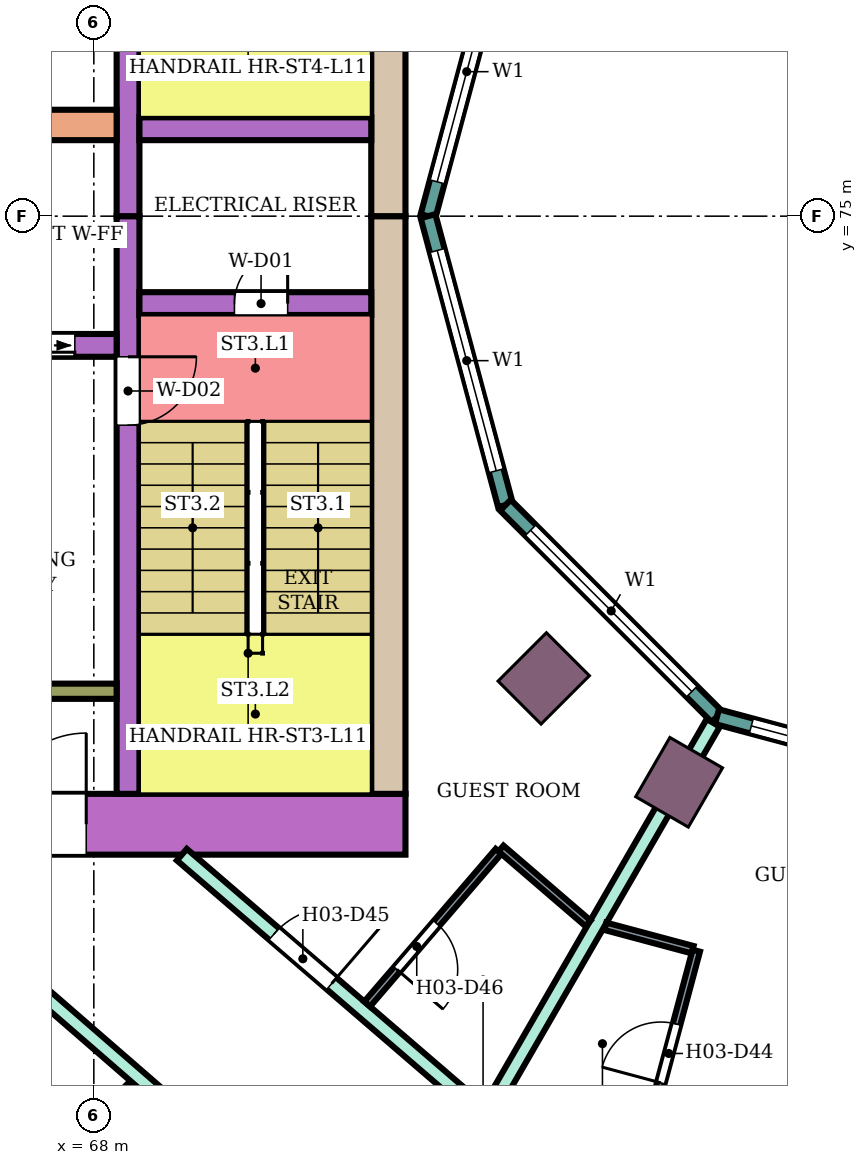
"""IFC4 building model, lengths in metres.
Left out: names, types, materials, properties, quantities, classifications, styles, units other than length and angle.
Written with IfcOpenShell. Run it as: python <this file> out.ifc"""

import sys

from ifc_helpers import new_model, si_unit, direction, frame, frame_2d, origin, origin_2d, place, context, subcontext, project, spatial, rectangle, extrude, element, fill, save


model = new_model("IFC4")
c1 = context("Model", 3, precision=1e-05, world=origin(), true_north=direction((0.0, 1.0)))
c2 = subcontext(c1, "Body", "Model", "MODEL_VIEW")
j1 = project(units=[si_unit("LENGTHUNIT", "METRE"), si_unit("PLANEANGLEUNIT", "RADIAN")], contexts=[c1])
p1 = place(None, origin())
s1 = spatial("IfcSite", under=j1, at=p1, CompositionType="ELEMENT")
p2 = place(p1, origin())
s2 = spatial("IfcBuilding", under=s1, at=p2, CompositionType="ELEMENT")
p3 = place(p2, frame((0.0, 0.0, 51.6)))
s3 = spatial("IfcBuildingStorey", under=s2, at=p3, CompositionType="ELEMENT", Elevation=51.6)
for number, where, z_axis, x_axis in (
    (1, (73.919, 68.919, 0.0), (0.0, 0.0, 1.0), (-0.707, -0.707, 0.0)),
    (2, (75.7, 67.552, 0.0), (0.0, 0.0, 1.0), (-0.5, -0.866, 0.0)),
):
    element("IfcColumn", number, at=place(p3, frame(where, z_axis=z_axis, x_axis=x_axis)), inside=s3, PredefinedType="COLUMN", context=c2, shape_type="SweptSolid", body=[
        extrude(rectangle(XDim=0.9, YDim=0.8, at=origin_2d()), origin(), (0.0, 0.0, 1.0), 3.8),
    ])
p4 = place(p3, frame((72.1, 67.0, 0.0), z_axis=(0.0, 0.0, 1.0), x_axis=(-1.0, 0.0, 0.0)))
e3 = element("IfcWall", 3, at=p4, inside=s3, PredefinedType="SHEAR", context=c2, shape_type="SweptSolid", body=[
    extrude(rectangle(XDim=14.7, YDim=0.8, at=frame_2d((7.35, 0.0))), origin(), (0.0, 0.0, 1.0), 3.48),
])
p5 = place(p4, frame((4.2, 0.0, 0.0)))
e4 = element("IfcOpeningElement", 4, at=p5, cuts=e3, PredefinedType="OPENING", context=c2, shape_type="SweptSolid", body=[
    extrude(rectangle(XDim=2.4, YDim=2.4, at=frame_2d((1.2, 1.2))), frame((0.0, 0.41, 0.0), z_axis=(0.0, -1.0, 0.0), x_axis=(1.0, 0.0, 0.0)), (0.0, 0.0, 1.0), 0.82),
])
for number, where, z_axis, x_axis in (
    (5, (71.875, 75.0, 0.0), (0.0, 0.0, 1.0), (0.0, -1.0, 0.0)),
    (6, (71.875, 82.6, 0.0), (0.0, 0.0, 1.0), (0.0, -1.0, 0.0)),
):
    element("IfcWall", number, at=place(p3, frame(where, z_axis=z_axis, x_axis=x_axis)), inside=s3, PredefinedType="SHEAR", context=c2, shape_type="SweptSolid", body=[
        extrude(rectangle(XDim=7.6, YDim=0.45, at=frame_2d((3.8, 0.0))), origin(), (0.0, 0.0, 1.0), 3.48),
    ])
p6 = place(p3, frame((68.45, 75.0, 0.0), z_axis=(0.0, 0.0, 1.0), x_axis=(0.0, -1.0, 0.0)))
e7 = element("IfcWall", 7, at=p6, inside=s3, PredefinedType="SHEAR", context=c2, shape_type="SweptSolid", body=[
    extrude(rectangle(XDim=7.6, YDim=0.3, at=frame_2d((3.8, 0.0))), origin(), (0.0, 0.0, 1.0), 3.48),
])
p7 = place(p6, frame((1.85, 0.0, 0.0)))
e8 = element("IfcOpeningElement", 8, at=p7, cuts=e7, PredefinedType="OPENING", context=c2, shape_type="SweptSolid", body=[
    extrude(rectangle(XDim=0.9, YDim=2.1, at=frame_2d((0.45, 1.05))), frame((0.0, 0.16, 0.0), z_axis=(0.0, -1.0, 0.0), x_axis=(1.0, 0.0, 0.0)), (0.0, 0.0, 1.0), 0.32),
])
p8 = place(p3, frame((68.45, 82.6, 0.0), z_axis=(0.0, 0.0, 1.0), x_axis=(0.0, -1.0, 0.0)))
e9 = element("IfcWall", 9, at=p8, inside=s3, PredefinedType="SHEAR", context=c2, shape_type="SweptSolid", body=[
    extrude(rectangle(XDim=7.6, YDim=0.3, at=frame_2d((3.8, 0.0))), origin(), (0.0, 0.0, 1.0), 3.48),
])
p9 = place(p8, frame((0.25, 0.0, 0.0)))
e10 = element("IfcOpeningElement", 10, at=p9, cuts=e9, PredefinedType="OPENING", context=c2, shape_type="SweptSolid", body=[
    extrude(rectangle(XDim=0.9, YDim=2.1, at=frame_2d((0.45, 1.05))), frame((0.0, 0.16, 0.0), z_axis=(0.0, -1.0, 0.0), x_axis=(1.0, 0.0, 0.0)), (0.0, 0.0, 1.0), 0.32),
])
p10 = place(p3, frame((71.65, 73.85, 0.0), z_axis=(0.0, 0.0, 1.0), x_axis=(-1.0, 0.0, 0.0)))
e11 = element("IfcWall", 11, at=p10, inside=s3, PredefinedType="SHEAR", context=c2, shape_type="SweptSolid", body=[
    extrude(rectangle(XDim=3.05, YDim=0.3, at=frame_2d((1.525, 0.0))), origin(), (0.0, 0.0, 1.0), 3.48),
])
p11 = place(p10, frame((1.1, 0.0, 0.0)))
e12 = element("IfcOpeningElement", 12, at=p11, cuts=e11, PredefinedType="OPENING", context=c2, shape_type="SweptSolid", body=[
    extrude(rectangle(XDim=0.7, YDim=2.0, at=frame_2d((0.35, 1.0))), frame((0.0, 0.16, 0.0), z_axis=(0.0, -1.0, 0.0), x_axis=(1.0, 0.0, 0.0)), (0.0, 0.0, 1.0), 0.32),
])
p12 = place(p3, frame((71.65, 76.15, 0.0), z_axis=(0.0, 0.0, 1.0), x_axis=(-1.0, 0.0, 0.0)))
e13 = element("IfcWall", 13, at=p12, inside=s3, PredefinedType="SHEAR", context=c2, shape_type="SweptSolid", body=[
    extrude(rectangle(XDim=3.05, YDim=0.3, at=frame_2d((1.525, 0.0))), origin(), (0.0, 0.0, 1.0), 3.48),
])
p13 = place(p3, frame((68.3, 73.3, 0.0), z_axis=(0.0, 0.0, 1.0), x_axis=(-1.0, 0.0, 0.0)))
e14 = element("IfcWall", 14, at=p13, inside=s3, PredefinedType="SHEAR", context=c2, shape_type="SweptSolid", body=[
    extrude(rectangle(XDim=10.9, YDim=0.3, at=frame_2d((5.45, 0.0))), origin(), (0.0, 0.0, 1.0), 3.48),
])
p14 = place(p13, frame((0.55, 0.0, 0.0)))
e15 = element("IfcOpeningElement", 15, at=p14, cuts=e14, PredefinedType="OPENING", context=c2, shape_type="SweptSolid", body=[
    extrude(rectangle(XDim=1.1, YDim=2.1, at=frame_2d((0.55, 1.05))), frame((0.0, 0.16, 0.0), z_axis=(0.0, -1.0, 0.0), x_axis=(1.0, 0.0, 0.0)), (0.0, 0.0, 1.0), 0.32),
])
p15 = place(p13, frame((8.1, 0.0, 0.0)))
e16 = element("IfcOpeningElement", 16, at=p15, cuts=e14, PredefinedType="OPENING", context=c2, shape_type="SweptSolid", body=[
    extrude(rectangle(XDim=1.0, YDim=2.1, at=frame_2d((0.5, 1.05))), frame((0.0, 0.16, 0.0), z_axis=(0.0, -1.0, 0.0), x_axis=(1.0, 0.0, 0.0)), (0.0, 0.0, 1.0), 0.32),
])
p16 = place(p3, frame((68.3, 76.2, 0.0), z_axis=(0.0, 0.0, 1.0), x_axis=(-1.0, 0.0, 0.0)))
e17 = element("IfcWall", 17, at=p16, inside=s3, PredefinedType="SHEAR", context=c2, shape_type="SweptSolid", body=[
    extrude(rectangle(XDim=10.9, YDim=0.4, at=frame_2d((5.45, 0.0))), origin(), (0.0, 0.0, 1.0), 3.48),
])
p17 = place(p3, frame((68.3, 68.75, 0.0), z_axis=(0.0, 0.0, 1.0), x_axis=(-1.0, 0.0, 0.0)))
e18 = element("IfcWall", 18, at=p17, inside=s3, PredefinedType="SHEAR", context=c2, shape_type="SweptSolid", body=[
    extrude(rectangle(XDim=4.65, YDim=0.2, at=frame_2d((2.325, 0.0))), origin(), (0.0, 0.0, 1.0), 3.48),
])
p18 = place(p3, frame((73.415, 78.802, 0.0), z_axis=(0.0, 0.0, 1.0), x_axis=(-0.258789828301, -0.965933654434, 0.0)))
e19 = element("IfcWall", 19, at=p18, inside=s3, PredefinedType="NOTDEFINED", context=c2, shape_type="SweptSolid", body=[
    extrude(rectangle(XDim=3.936, YDim=0.2, at=frame_2d((1.968, 0.0))), origin(), (0.0, 0.0, 1.0), 3.8),
])
p19 = place(p18, frame((0.468, 0.0, 0.9)))
e20 = element("IfcOpeningElement", 20, at=p19, cuts=e19, PredefinedType="OPENING", context=c2, shape_type="SweptSolid", body=[
    extrude(rectangle(XDim=3.0, YDim=2.3, at=frame_2d((1.5, 1.15))), frame((0.0, 0.11, 0.0), z_axis=(0.0, -1.0, 0.0), x_axis=(1.0, 0.0, 0.0)), (0.0, 0.0, 1.0), 0.22),
])
p20 = place(p3, frame((72.396, 75.0, 0.0), z_axis=(0.0, 0.0, 1.0), x_axis=(0.258789828301, -0.965933654434, 0.0)))
e21 = element("IfcWall", 21, at=p20, inside=s3, PredefinedType="NOTDEFINED", context=c2, shape_type="SweptSolid", body=[
    extrude(rectangle(XDim=3.936, YDim=0.2, at=frame_2d((1.968, 0.0))), origin(), (0.0, 0.0, 1.0), 3.8),
])
p21 = place(p20, frame((0.468, 0.0, 0.9)))
e22 = element("IfcOpeningElement", 22, at=p21, cuts=e21, PredefinedType="OPENING", context=c2, shape_type="SweptSolid", body=[
    extrude(rectangle(XDim=3.0, YDim=2.3, at=frame_2d((1.5, 1.15))), frame((0.0, 0.11, 0.0), z_axis=(0.0, -1.0, 0.0), x_axis=(1.0, 0.0, 0.0)), (0.0, 0.0, 1.0), 0.22),
])
p22 = place(p3, frame((73.415, 71.198, 0.0), z_axis=(0.0, 0.0, 1.0), x_axis=(0.707106781187, -0.707106781187, 0.0)))
e23 = element("IfcWall", 23, at=p22, inside=s3, PredefinedType="NOTDEFINED", context=c2, shape_type="SweptSolid", body=[
    extrude(rectangle(XDim=3.936, YDim=0.2, at=frame_2d((1.968, 0.0))), origin(), (0.0, 0.0, 1.0), 3.8),
])
p23 = place(p22, frame((0.468, 0.0, 0.9)))
e24 = element("IfcOpeningElement", 24, at=p23, cuts=e23, PredefinedType="OPENING", context=c2, shape_type="SweptSolid", body=[
    extrude(rectangle(XDim=3.0, YDim=2.3, at=frame_2d((1.5, 1.15))), frame((0.0, 0.11, 0.0), z_axis=(0.0, -1.0, 0.0), x_axis=(1.0, 0.0, 0.0)), (0.0, 0.0, 1.0), 0.22),
])
p24 = place(p3, frame((76.198, 68.415, 0.0), z_axis=(0.0, 0.0, 1.0), x_axis=(0.965933654434, -0.258789828301, 0.0)))
e25 = element("IfcWall", 25, at=p24, inside=s3, PredefinedType="NOTDEFINED", context=c2, shape_type="SweptSolid", body=[
    extrude(rectangle(XDim=3.936, YDim=0.2, at=frame_2d((1.968, 0.0))), origin(), (0.0, 0.0, 1.0), 3.8),
])
p25 = place(p24, frame((0.468, 0.0, 0.9)))
e26 = element("IfcOpeningElement", 26, at=p25, cuts=e25, PredefinedType="OPENING", context=c2, shape_type="SweptSolid", body=[
    extrude(rectangle(XDim=3.0, YDim=2.3, at=frame_2d((1.5, 1.15))), frame((0.0, 0.11, 0.0), z_axis=(0.0, -1.0, 0.0), x_axis=(1.0, 0.0, 0.0)), (0.0, 0.0, 1.0), 0.22),
])
p26 = place(p3, frame((63.596, 58.596, 0.0), z_axis=(0.0, 0.0, 1.0), x_axis=(0.707106781187, 0.707106781187, 0.0)))
e27 = element("IfcWall", 27, at=p26, inside=s3, PredefinedType="PARTITIONING", context=c2, shape_type="SweptSolid", body=[
    extrude(rectangle(XDim=7.005, YDim=0.2, at=frame_2d((3.503, 0.0))), origin(), (0.0, 0.0, 1.0), 3.35),
])
p27 = place(p3, frame((67.081, 64.971, 0.0), z_axis=(0.0, 0.0, 1.0), x_axis=(0.755031061605, -0.65568902386, 0.0)))
e28 = element("IfcWall", 28, at=p27, inside=s3, PredefinedType="PARTITIONING", context=c2, shape_type="SweptSolid", body=[
    extrude(rectangle(XDim=6.186, YDim=0.2, at=frame_2d((3.093, 0.0))), origin(), (0.0, 0.0, 1.0), 3.35),
])
p28 = place(p27, frame((4.755, 0.0, 0.0)))
e29 = element("IfcOpeningElement", 29, at=p28, cuts=e28, PredefinedType="OPENING", context=c2, shape_type="SweptSolid", body=[
    extrude(rectangle(XDim=1.0, YDim=2.1, at=frame_2d((0.5, 1.05))), frame((0.0, 0.11, 0.0), z_axis=(0.0, -1.0, 0.0), x_axis=(1.0, 0.0, 0.0)), (0.0, 0.0, 1.0), 0.22),
])
p29 = place(p3, frame((69.158, 66.6, 0.0), z_axis=(0.0, 0.0, 1.0), x_axis=(0.757976058094, -0.652282373943, 0.0)))
e30 = element("IfcWall", 30, at=p29, inside=s3, PredefinedType="PARTITIONING", context=c2, shape_type="SweptSolid", body=[
    extrude(rectangle(XDim=5.16, YDim=0.2, at=frame_2d((2.58, 0.0))), origin(), (0.0, 0.0, 1.0), 3.35),
])
p30 = place(p29, frame((1.6, 0.0, 0.0)))
e31 = element("IfcOpeningElement", 31, at=p30, cuts=e30, PredefinedType="OPENING", context=c2, shape_type="SweptSolid", body=[
    extrude(rectangle(XDim=1.0, YDim=2.1, at=frame_2d((0.5, 1.05))), frame((0.0, 0.11, 0.0), z_axis=(0.0, -1.0, 0.0), x_axis=(1.0, 0.0, 0.0)), (0.0, 0.0, 1.0), 0.22),
])
p31 = place(p3, frame((73.17, 63.177, 0.0), z_axis=(0.0, 0.0, 1.0), x_axis=(0.500239348149, 0.865887171959, 0.0)))
e32 = element("IfcWall", 32, at=p31, inside=s3, PredefinedType="PARTITIONING", context=c2, shape_type="SweptSolid", body=[
    extrude(rectangle(XDim=5.955, YDim=0.2, at=frame_2d((2.978, 0.0))), origin(), (0.0, 0.0, 1.0), 3.35),
])
p32 = place(p3, frame((71.596, 64.635, 0.0), z_axis=(0.0, 0.0, 1.0), x_axis=(0.652285007511, 0.757973791748, 0.0)))
e33 = element("IfcWall", 33, at=p32, inside=s3, PredefinedType="PARTITIONING", context=c2, shape_type="SweptSolid", body=[
    extrude(rectangle(XDim=2.65, YDim=0.1, at=frame_2d((1.325, 0.0))), origin(), (0.0, 0.0, 1.0), 3.35),
])
p33 = place(p32, frame((0.6, 0.0, 0.0)))
e34 = element("IfcOpeningElement", 34, at=p33, cuts=e33, PredefinedType="OPENING", context=c2, shape_type="SweptSolid", body=[
    extrude(rectangle(XDim=0.8, YDim=2.1, at=frame_2d((0.4, 1.05))), frame((0.0, 0.06, 0.0), z_axis=(0.0, -1.0, 0.0), x_axis=(1.0, 0.0, 0.0)), (0.0, 0.0, 1.0), 0.12),
])
p34 = place(p3, frame((73.357, 66.681, 0.0), z_axis=(0.0, 0.0, 1.0), x_axis=(0.758263469747, -0.651948242154, 0.0)))
e35 = element("IfcWall", 35, at=p34, inside=s3, PredefinedType="PARTITIONING", context=c2, shape_type="SweptSolid", body=[
    extrude(rectangle(XDim=1.511, YDim=0.1, at=frame_2d((0.755, 0.0))), origin(), (0.0, 0.0, 1.0), 3.35),
])
p35 = place(p3, frame((74.729, 65.657, 0.0), z_axis=(0.0, 0.0, 1.0), x_axis=(0.965948051503, -0.258736085224, 0.0)))
e36 = element("IfcWall", 36, at=p35, inside=s3, PredefinedType="PARTITIONING", context=c2, shape_type="SweptSolid", body=[
    extrude(rectangle(XDim=1.189, YDim=0.1, at=frame_2d((0.594, 0.0))), origin(), (0.0, 0.0, 1.0), 3.35),
])
p36 = place(p3, frame((75.227, 62.729, 0.0), z_axis=(0.0, 0.0, 1.0), x_axis=(0.258945475746, 0.965891940432, 0.0)))
e37 = element("IfcWall", 37, at=p36, inside=s3, PredefinedType="PARTITIONING", context=c2, shape_type="SweptSolid", body=[
    extrude(rectangle(XDim=2.7, YDim=0.1, at=frame_2d((1.35, 0.0))), origin(), (0.0, 0.0, 1.0), 3.35),
])
p37 = place(p36, frame((0.9, 0.0, 0.0)))
e38 = element("IfcOpeningElement", 38, at=p37, cuts=e37, PredefinedType="OPENING", context=c2, shape_type="SweptSolid", body=[
    extrude(rectangle(XDim=0.8, YDim=2.1, at=frame_2d((0.4, 1.05))), frame((0.0, 0.06, 0.0), z_axis=(0.0, -1.0, 0.0), x_axis=(1.0, 0.0, 0.0)), (0.0, 0.0, 1.0), 0.12),
])
p38 = place(p19, origin())
e39 = element("IfcWindow", 39, at=p38, inside=s3, PartitioningType="SINGLE_PANEL", PredefinedType="WINDOW", context=c2, shape_type="SweptSolid", body=[
    extrude(rectangle(XDim=3.0, YDim=2.3, at=frame_2d((1.5, 1.15))), frame((0.0, 0.03, 0.0), z_axis=(0.0, -1.0, 0.0), x_axis=(1.0, 0.0, 0.0)), (0.0, 0.0, 1.0), 0.06),
])
fill(e20, e39)
p39 = place(p21, origin())
e40 = element("IfcWindow", 40, at=p39, inside=s3, PartitioningType="SINGLE_PANEL", PredefinedType="WINDOW", context=c2, shape_type="SweptSolid", body=[
    extrude(rectangle(XDim=3.0, YDim=2.3, at=frame_2d((1.5, 1.15))), frame((0.0, 0.03, 0.0), z_axis=(0.0, -1.0, 0.0), x_axis=(1.0, 0.0, 0.0)), (0.0, 0.0, 1.0), 0.06),
])
fill(e22, e40)
p40 = place(p23, origin())
e41 = element("IfcWindow", 41, at=p40, inside=s3, PartitioningType="SINGLE_PANEL", PredefinedType="WINDOW", context=c2, shape_type="SweptSolid", body=[
    extrude(rectangle(XDim=3.0, YDim=2.3, at=frame_2d((1.5, 1.15))), frame((0.0, 0.03, 0.0), z_axis=(0.0, -1.0, 0.0), x_axis=(1.0, 0.0, 0.0)), (0.0, 0.0, 1.0), 0.06),
])
fill(e24, e41)
p41 = place(p25, origin())
e42 = element("IfcWindow", 42, at=p41, inside=s3, PartitioningType="SINGLE_PANEL", PredefinedType="WINDOW", context=c2, shape_type="SweptSolid", body=[
    extrude(rectangle(XDim=3.0, YDim=2.3, at=frame_2d((1.5, 1.15))), frame((0.0, 0.03, 0.0), z_axis=(0.0, -1.0, 0.0), x_axis=(1.0, 0.0, 0.0)), (0.0, 0.0, 1.0), 0.06),
])
fill(e26, e42)
p42 = place(p37, origin())
e43 = element("IfcDoor", 43, at=p42, inside=s3, OperationType="SINGLE_SWING_LEFT", PredefinedType="DOOR", context=c2, shape_type="SweptSolid", body=[
    extrude(rectangle(XDim=0.8, YDim=2.1, at=frame_2d((0.4, 1.05))), frame((0.0, 0.025, 0.0), z_axis=(0.0, -1.0, 0.0), x_axis=(1.0, 0.0, 0.0)), (0.0, 0.0, 1.0), 0.05),
])
fill(e38, e43)
p43 = place(p30, origin())
e44 = element("IfcDoor", 44, at=p43, inside=s3, OperationType="SINGLE_SWING_RIGHT", PredefinedType="DOOR", context=c2, shape_type="SweptSolid", body=[
    extrude(rectangle(XDim=1.0, YDim=2.1, at=frame_2d((0.5, 1.05))), frame((0.0, 0.025, 0.0), z_axis=(0.0, -1.0, 0.0), x_axis=(1.0, 0.0, 0.0)), (0.0, 0.0, 1.0), 0.05),
])
fill(e31, e44)
p44 = place(p33, frame((0.8, 0.0, 0.0), z_axis=(0.0, 0.0, 1.0), x_axis=(-1.0, 0.0, 0.0)))
e45 = element("IfcDoor", 45, at=p44, inside=s3, OperationType="SINGLE_SWING_RIGHT", PredefinedType="DOOR", context=c2, shape_type="SweptSolid", body=[
    extrude(rectangle(XDim=0.8, YDim=2.1, at=frame_2d((0.4, 1.05))), frame((0.0, 0.025, 0.0), z_axis=(0.0, -1.0, 0.0), x_axis=(1.0, 0.0, 0.0)), (0.0, 0.0, 1.0), 0.05),
])
fill(e34, e45)
p45 = place(p11, frame((0.7, 0.0, 0.0), z_axis=(0.0, 0.0, 1.0), x_axis=(-1.0, 0.0, 0.0)))
e46 = element("IfcDoor", 46, at=p45, inside=s3, OperationType="SINGLE_SWING_RIGHT", PredefinedType="DOOR", context=c2, shape_type="SweptSolid", body=[
    extrude(rectangle(XDim=0.7, YDim=2.0, at=frame_2d((0.35, 1.0))), frame((0.0, 0.025, 0.0), z_axis=(0.0, -1.0, 0.0), x_axis=(1.0, 0.0, 0.0)), (0.0, 0.0, 1.0), 0.05),
])
fill(e12, e46)
p46 = place(p7, origin())
e47 = element("IfcDoor", 47, at=p46, inside=s3, OperationType="SINGLE_SWING_LEFT", PredefinedType="DOOR", context=c2, shape_type="SweptSolid", body=[
    extrude(rectangle(XDim=0.9, YDim=2.1, at=frame_2d((0.45, 1.05))), frame((0.0, 0.025, 0.0), z_axis=(0.0, -1.0, 0.0), x_axis=(1.0, 0.0, 0.0)), (0.0, 0.0, 1.0), 0.05),
])
fill(e8, e47)
p47 = place(p14, origin())
e48 = element("IfcDoor", 48, at=p47, inside=s3, OperationType="DOUBLE_DOOR_SLIDING", PredefinedType="DOOR", context=c2, shape_type="SweptSolid", body=[
    extrude(rectangle(XDim=1.1, YDim=2.1, at=frame_2d((0.55, 1.05))), frame((0.0, 0.025, 0.0), z_axis=(0.0, -1.0, 0.0), x_axis=(1.0, 0.0, 0.0)), (0.0, 0.0, 1.0), 0.05),
])
fill(e15, e48)
p48 = place(p5, frame((2.4, 0.0, 0.0), z_axis=(0.0, 0.0, 1.0), x_axis=(-1.0, 0.0, 0.0)))
e49 = element("IfcDoor", 49, at=p48, inside=s3, OperationType="DOUBLE_DOOR_SINGLE_SWING", PredefinedType="DOOR", context=c2, shape_type="SweptSolid", body=[
    extrude(rectangle(XDim=2.4, YDim=2.4, at=frame_2d((1.2, 1.2))), frame((0.0, 0.025, 0.0), z_axis=(0.0, -1.0, 0.0), x_axis=(1.0, 0.0, 0.0)), (0.0, 0.0, 1.0), 0.05),
])
fill(e4, e49)
save(model, sys.argv[1])
